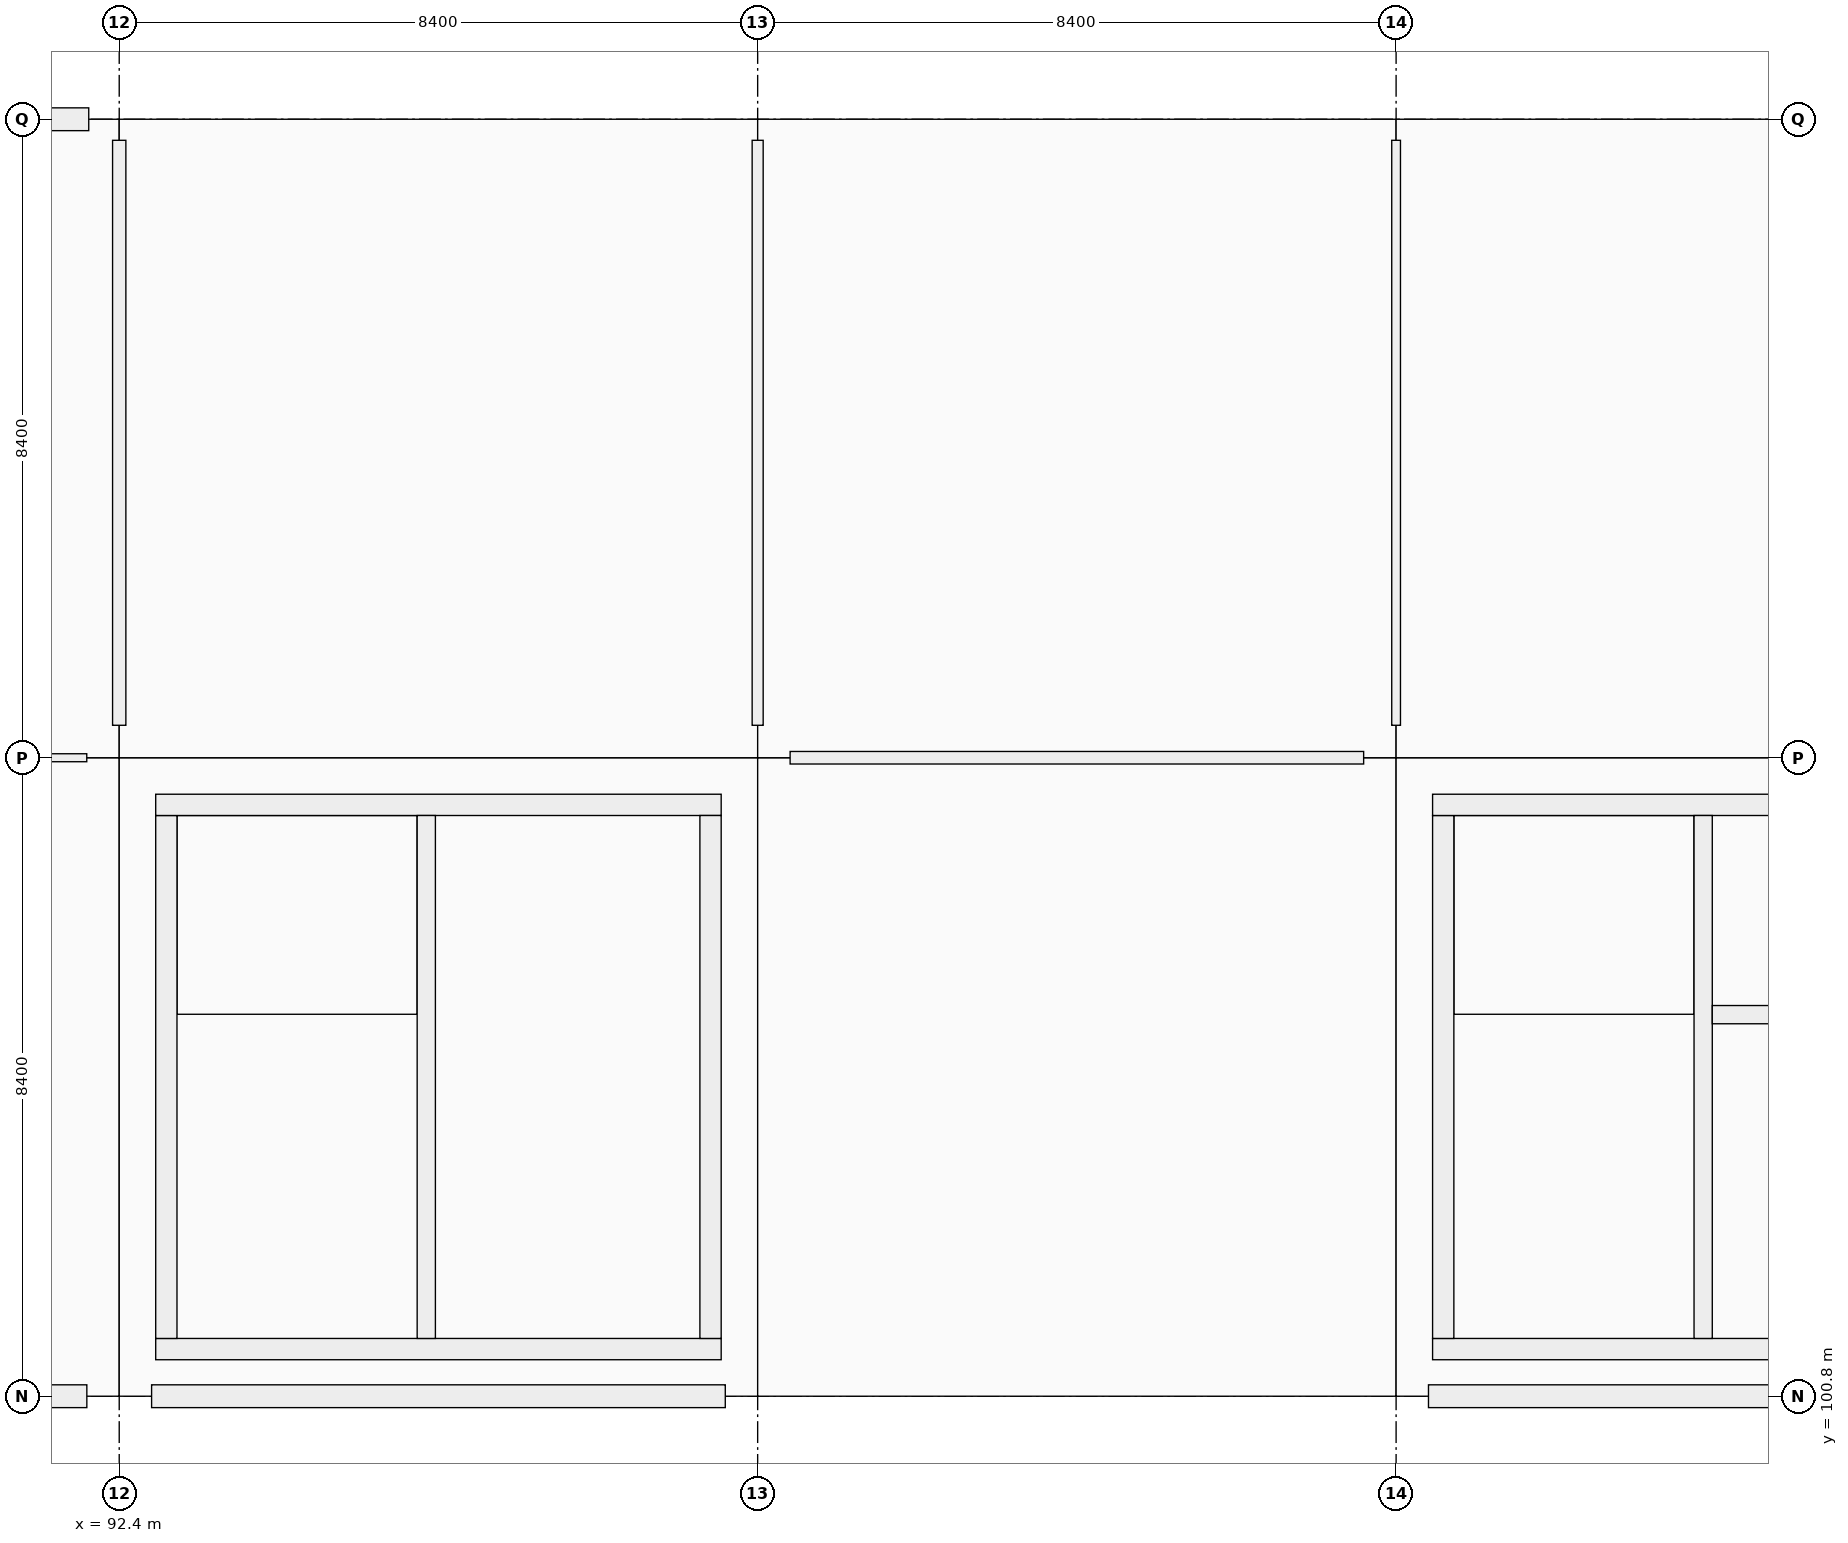
"""IFC4 building model, lengths in metres.
Left out: names, types, materials, properties, quantities, classifications, styles, units other than length and angle.
Written with IfcOpenShell. Run it as: python <this file> out.ifc"""

import sys

from ifc_helpers import new_model, si_unit, direction, frame, frame_2d, origin, origin_2d, place, context, subcontext, project, spatial, rectangle, extrude, element, fill, save


model = new_model("IFC4")
c1 = context("Model", 3, precision=1e-05, world=origin(), true_north=direction((0.0, 1.0)))
c2 = subcontext(c1, "Body", "Model", "MODEL_VIEW")
j1 = project(units=[si_unit("LENGTHUNIT", "METRE"), si_unit("PLANEANGLEUNIT", "RADIAN")], contexts=[c1])
p1 = place(None, origin())
s1 = spatial("IfcSite", under=j1, at=p1, CompositionType="ELEMENT")
p2 = place(p1, origin())
s2 = spatial("IfcBuilding", under=s1, at=p2, CompositionType="ELEMENT")
p3 = place(p2, frame((0.0, 0.0, 10.26)))
s3 = spatial("IfcBuildingStorey", under=s2, at=p3, CompositionType="ELEMENT", Elevation=10.26)
for number, where, z_axis, x_axis in (
    (1, (92.4, 100.8, 0.0), (0.0, 0.0, 1.0), (1.0, 0.0, 0.0)),
    (2, (92.4, 109.2, 0.0), (0.0, 0.0, 1.0), (1.0, 0.0, 0.0)),
):
    element("IfcColumn", number, at=place(p3, frame(where, z_axis=z_axis, x_axis=x_axis)), inside=s3, PredefinedType="COLUMN", context=c2, shape_type="SweptSolid", body=[
        extrude(rectangle(XDim=0.85, YDim=0.85, at=origin_2d()), origin(), (0.0, 0.0, 1.0), 4.5),
    ])
p4 = place(p3, frame((92.4, 117.6, 0.0), z_axis=(0.0, 0.0, 1.0), x_axis=(1.0, 0.0, 0.0)))
e3 = element("IfcColumn", 3, at=p4, inside=s3, PredefinedType="COLUMN", context=c2, shape_type="SweptSolid", body=[
    extrude(rectangle(XDim=0.8, YDim=0.55, at=origin_2d()), origin(), (0.0, 0.0, 1.0), 4.5),
])
for number, where, z_axis, x_axis in (
    (4, (100.8, 100.8, 0.0), (0.0, 0.0, 1.0), (1.0, 0.0, 0.0)),
    (5, (100.8, 109.2, 0.0), (0.0, 0.0, 1.0), (1.0, 0.0, 0.0)),
):
    element("IfcColumn", number, at=place(p3, frame(where, z_axis=z_axis, x_axis=x_axis)), inside=s3, PredefinedType="COLUMN", context=c2, shape_type="SweptSolid", body=[
        extrude(rectangle(XDim=0.85, YDim=0.85, at=origin_2d()), origin(), (0.0, 0.0, 1.0), 4.5),
    ])
p5 = place(p3, frame((100.8, 117.6, 0.0), z_axis=(0.0, 0.0, 1.0), x_axis=(1.0, 0.0, 0.0)))
e6 = element("IfcColumn", 6, at=p5, inside=s3, PredefinedType="COLUMN", context=c2, shape_type="SweptSolid", body=[
    extrude(rectangle(XDim=0.8, YDim=0.55, at=origin_2d()), origin(), (0.0, 0.0, 1.0), 4.5),
])
for number, where, z_axis, x_axis in (
    (7, (109.2, 100.8, 0.0), (0.0, 0.0, 1.0), (1.0, 0.0, 0.0)),
    (8, (109.2, 109.2, 0.0), (0.0, 0.0, 1.0), (1.0, 0.0, 0.0)),
):
    element("IfcColumn", number, at=place(p3, frame(where, z_axis=z_axis, x_axis=x_axis)), inside=s3, PredefinedType="COLUMN", context=c2, shape_type="SweptSolid", body=[
        extrude(rectangle(XDim=0.85, YDim=0.85, at=origin_2d()), origin(), (0.0, 0.0, 1.0), 4.5),
    ])
p6 = place(p3, frame((109.2, 117.6, 0.0), z_axis=(0.0, 0.0, 1.0), x_axis=(1.0, 0.0, 0.0)))
e9 = element("IfcColumn", 9, at=p6, inside=s3, PredefinedType="COLUMN", context=c2, shape_type="SweptSolid", body=[
    extrude(rectangle(XDim=0.8, YDim=0.55, at=origin_2d()), origin(), (0.0, 0.0, 1.0), 4.5),
])
p7 = place(p3, frame((91.974, 100.8, 0.0), z_axis=(0.0, 0.0, 1.0), x_axis=(-1.0, 0.0, 0.0)))
e10 = element("IfcWall", 10, at=p7, inside=s3, PredefinedType="SOLIDWALL", context=c2, shape_type="SweptSolid", body=[
    extrude(rectangle(XDim=7.548, YDim=0.3, at=frame_2d((3.774, 0.0))), origin(), (0.0, 0.0, 1.0), 3.54),
])
p8 = place(p7, frame((3.324, 0.0, 0.9)))
e11 = element("IfcOpeningElement", 11, at=p8, cuts=e10, PredefinedType="OPENING", context=c2, shape_type="SweptSolid", body=[
    extrude(rectangle(XDim=0.9, YDim=1.5, at=frame_2d((0.45, 0.75))), frame((0.0, 0.15, 0.0), z_axis=(0.0, -1.0, 0.0), x_axis=(1.0, 0.0, 0.0)), (0.0, 0.0, 1.0), 0.3),
])
p9 = place(p3, frame((84.401, 117.6, 0.0), z_axis=(0.0, 0.0, 1.0), x_axis=(1.0, 0.0, 0.0)))
e12 = element("IfcWall", 12, at=p9, inside=s3, PredefinedType="SOLIDWALL", context=c2, shape_type="SweptSolid", body=[
    extrude(rectangle(XDim=7.598, YDim=0.3, at=frame_2d((3.799, 0.0))), origin(), (0.0, 0.0, 1.0), 3.54),
])
p10 = place(p9, frame((2.949, 0.0, 0.9)))
e13 = element("IfcOpeningElement", 13, at=p10, cuts=e12, PredefinedType="OPENING", context=c2, shape_type="SweptSolid", body=[
    extrude(rectangle(XDim=1.7, YDim=1.85, at=frame_2d((0.85, 0.925))), frame((0.0, 0.15, 0.0), z_axis=(0.0, -1.0, 0.0), x_axis=(1.0, 0.0, 0.0)), (0.0, 0.0, 1.0), 0.3),
])
for number, where, z_axis, x_axis in (
    (14, (100.374, 100.8, 0.0), (0.0, 0.0, 1.0), (-1.0, 0.0, 0.0)),
    (15, (117.174, 100.8, 0.0), (0.0, 0.0, 1.0), (-1.0, 0.0, 0.0)),
):
    element("IfcWall", number, at=place(p3, frame(where, z_axis=z_axis, x_axis=x_axis)), inside=s3, PredefinedType="SOLIDWALL", context=c2, shape_type="SweptSolid", body=[
        extrude(rectangle(XDim=7.548, YDim=0.3, at=frame_2d((3.774, 0.0))), origin(), (0.0, 0.0, 1.0), 3.54),
    ])
p11 = place(p3, frame((117.12, 101.42, 0.0), z_axis=(0.0, 0.0, 1.0), x_axis=(-1.0, 0.0, 0.0)))
e16 = element("IfcWall", 16, at=p11, inside=s3, PredefinedType="SHEAR", context=c2, shape_type="SweptSolid", body=[
    extrude(rectangle(XDim=7.44, YDim=0.28, at=frame_2d((3.72, 0.0))), origin(), (0.0, 0.0, 1.0), 4.5),
])
p12 = place(p3, frame((109.82, 101.56, 0.0), z_axis=(0.0, 0.0, 1.0), x_axis=(0.0, 1.0, 0.0)))
e17 = element("IfcWall", 17, at=p12, inside=s3, PredefinedType="SHEAR", context=c2, shape_type="SweptSolid", body=[
    extrude(rectangle(XDim=6.88, YDim=0.28, at=frame_2d((3.44, 0.0))), origin(), (0.0, 0.0, 1.0), 4.5),
])
p13 = place(p3, frame((109.68, 108.58, 0.0), z_axis=(0.0, 0.0, 1.0), x_axis=(1.0, 0.0, 0.0)))
e18 = element("IfcWall", 18, at=p13, inside=s3, PredefinedType="SHEAR", context=c2, shape_type="SweptSolid", body=[
    extrude(rectangle(XDim=7.44, YDim=0.28, at=frame_2d((3.72, 0.0))), origin(), (0.0, 0.0, 1.0), 4.5),
])
p14 = place(p3, frame((113.24, 101.56, 0.0), z_axis=(0.0, 0.0, 1.0), x_axis=(0.0, 1.0, 0.0)))
e19 = element("IfcWall", 19, at=p14, inside=s3, PredefinedType="SHEAR", context=c2, shape_type="SweptSolid", body=[
    extrude(rectangle(XDim=6.88, YDim=0.24, at=frame_2d((3.44, 0.0))), origin(), (0.0, 0.0, 1.0), 4.5),
])
p15 = place(p14, frame((0.12, 0.0, 0.0)))
e20 = element("IfcOpeningElement", 20, at=p15, cuts=e19, PredefinedType="OPENING", context=c2, shape_type="SweptSolid", body=[
    extrude(rectangle(XDim=1.0, YDim=2.15, at=frame_2d((0.5, 1.075))), frame((0.0, 0.12, 0.0), z_axis=(0.0, -1.0, 0.0), x_axis=(1.0, 0.0, 0.0)), (0.0, 0.0, 1.0), 0.24),
])
p16 = place(p3, frame((113.36, 105.82, 0.0), z_axis=(0.0, 0.0, 1.0), x_axis=(1.0, 0.0, 0.0)))
e21 = element("IfcWall", 21, at=p16, inside=s3, PredefinedType="SHEAR", context=c2, shape_type="SweptSolid", body=[
    extrude(rectangle(XDim=3.48, YDim=0.24, at=frame_2d((1.74, 0.0))), origin(), (0.0, 0.0, 1.0), 4.5),
])
p17 = place(p16, frame((1.14, 0.0, 0.0)))
e22 = element("IfcOpeningElement", 22, at=p17, cuts=e21, PredefinedType="OPENING", context=c2, shape_type="SweptSolid", body=[
    extrude(rectangle(XDim=1.2, YDim=2.2, at=frame_2d((0.6, 1.1))), frame((0.0, 0.12, 0.0), z_axis=(0.0, -1.0, 0.0), x_axis=(1.0, 0.0, 0.0)), (0.0, 0.0, 1.0), 0.24),
])
p18 = place(p3, frame((100.32, 101.42, 0.0), z_axis=(0.0, 0.0, 1.0), x_axis=(-1.0, 0.0, 0.0)))
e23 = element("IfcWall", 23, at=p18, inside=s3, PredefinedType="SHEAR", context=c2, shape_type="SweptSolid", body=[
    extrude(rectangle(XDim=7.44, YDim=0.28, at=frame_2d((3.72, 0.0))), origin(), (0.0, 0.0, 1.0), 4.5),
])
p19 = place(p3, frame((93.02, 101.56, 0.0), z_axis=(0.0, 0.0, 1.0), x_axis=(0.0, 1.0, 0.0)))
e24 = element("IfcWall", 24, at=p19, inside=s3, PredefinedType="SHEAR", context=c2, shape_type="SweptSolid", body=[
    extrude(rectangle(XDim=6.88, YDim=0.28, at=frame_2d((3.44, 0.0))), origin(), (0.0, 0.0, 1.0), 4.5),
])
p20 = place(p3, frame((92.88, 108.58, 0.0), z_axis=(0.0, 0.0, 1.0), x_axis=(1.0, 0.0, 0.0)))
e25 = element("IfcWall", 25, at=p20, inside=s3, PredefinedType="SHEAR", context=c2, shape_type="SweptSolid", body=[
    extrude(rectangle(XDim=7.44, YDim=0.28, at=frame_2d((3.72, 0.0))), origin(), (0.0, 0.0, 1.0), 4.5),
])
p21 = place(p3, frame((100.18, 108.44, 0.0), z_axis=(0.0, 0.0, 1.0), x_axis=(0.0, -1.0, 0.0)))
e26 = element("IfcWall", 26, at=p21, inside=s3, PredefinedType="SHEAR", context=c2, shape_type="SweptSolid", body=[
    extrude(rectangle(XDim=6.88, YDim=0.28, at=frame_2d((3.44, 0.0))), origin(), (0.0, 0.0, 1.0), 4.5),
])
p22 = place(p21, frame((3.99, 0.0, 0.0)))
e27 = element("IfcOpeningElement", 27, at=p22, cuts=e26, PredefinedType="OPENING", context=c2, shape_type="SweptSolid", body=[
    extrude(rectangle(XDim=1.5, YDim=2.15, at=frame_2d((0.75, 1.075))), frame((0.0, 0.14, 0.0), z_axis=(0.0, -1.0, 0.0), x_axis=(1.0, 0.0, 0.0)), (0.0, 0.0, 1.0), 0.28),
])
p23 = place(p3, frame((96.44, 101.56, 0.0), z_axis=(0.0, 0.0, 1.0), x_axis=(0.0, 1.0, 0.0)))
e28 = element("IfcWall", 28, at=p23, inside=s3, PredefinedType="SHEAR", context=c2, shape_type="SweptSolid", body=[
    extrude(rectangle(XDim=6.88, YDim=0.24, at=frame_2d((3.44, 0.0))), origin(), (0.0, 0.0, 1.0), 4.5),
])
p24 = place(p23, frame((0.12, 0.0, 0.0)))
e29 = element("IfcOpeningElement", 29, at=p24, cuts=e28, PredefinedType="OPENING", context=c2, shape_type="SweptSolid", body=[
    extrude(rectangle(XDim=1.0, YDim=2.15, at=frame_2d((0.5, 1.075))), frame((0.0, 0.12, 0.0), z_axis=(0.0, -1.0, 0.0), x_axis=(1.0, 0.0, 0.0)), (0.0, 0.0, 1.0), 0.24),
])
p25 = place(p3, frame((84.427, 109.2, 0.0), z_axis=(0.0, 0.0, 1.0), x_axis=(1.0, 0.0, 0.0)))
e30 = element("IfcWall", 30, at=p25, inside=s3, PredefinedType="PARTITIONING", context=c2, shape_type="SweptSolid", body=[
    extrude(rectangle(XDim=7.546, YDim=0.105, at=frame_2d((3.773, 0.0))), origin(), (0.0, 0.0, 1.0), 3.37),
])
p26 = place(p25, frame((3.288, 0.0, 0.0)))
e31 = element("IfcOpeningElement", 31, at=p26, cuts=e30, PredefinedType="OPENING", context=c2, shape_type="SweptSolid", body=[
    extrude(rectangle(XDim=0.97, YDim=2.12, at=frame_2d((0.485, 1.06))), frame((0.0, 0.052, 0.0), z_axis=(0.0, -1.0, 0.0), x_axis=(1.0, 0.0, 0.0)), (0.0, 0.0, 1.0), 0.105),
])
p27 = place(p3, frame((101.227, 109.2, 0.0), z_axis=(0.0, 0.0, 1.0), x_axis=(1.0, 0.0, 0.0)))
e32 = element("IfcWall", 32, at=p27, inside=s3, PredefinedType="PARTITIONING", context=c2, shape_type="SweptSolid", body=[
    extrude(rectangle(XDim=7.546, YDim=0.165, at=frame_2d((3.773, 0.0))), origin(), (0.0, 0.0, 1.0), 3.37),
])
p28 = place(p27, frame((3.273, 0.0, 0.0)))
e33 = element("IfcOpeningElement", 33, at=p28, cuts=e32, PredefinedType="OPENING", context=c2, shape_type="SweptSolid", body=[
    extrude(rectangle(XDim=1.0, YDim=2.2, at=frame_2d((0.5, 1.1))), frame((0.0, 0.083, 0.0), z_axis=(0.0, -1.0, 0.0), x_axis=(1.0, 0.0, 0.0)), (0.0, 0.0, 1.0), 0.165),
])
p29 = place(p3, frame((92.4, 109.627, 0.0), z_axis=(0.0, 0.0, 1.0), x_axis=(0.0, 1.0, 0.0)))
e34 = element("IfcWall", 34, at=p29, inside=s3, PredefinedType="PARTITIONING", context=c2, shape_type="SweptSolid", body=[
    extrude(rectangle(XDim=7.696, YDim=0.175, at=frame_2d((3.848, 0.0))), origin(), (0.0, 0.0, 1.0), 3.37),
])
p30 = place(p29, frame((3.363, 0.0, 0.0)))
e35 = element("IfcOpeningElement", 35, at=p30, cuts=e34, PredefinedType="OPENING", context=c2, shape_type="SweptSolid", body=[
    extrude(rectangle(XDim=0.97, YDim=2.12, at=frame_2d((0.485, 1.06))), frame((0.0, 0.087, 0.0), z_axis=(0.0, -1.0, 0.0), x_axis=(1.0, 0.0, 0.0)), (0.0, 0.0, 1.0), 0.175),
])
p31 = place(p3, frame((100.8, 109.627, 0.0), z_axis=(0.0, 0.0, 1.0), x_axis=(0.0, 1.0, 0.0)))
e36 = element("IfcWall", 36, at=p31, inside=s3, PredefinedType="PARTITIONING", context=c2, shape_type="SweptSolid", body=[
    extrude(rectangle(XDim=7.696, YDim=0.145, at=frame_2d((3.848, 0.0))), origin(), (0.0, 0.0, 1.0), 3.37),
])
p32 = place(p31, frame((3.388, 0.0, 0.0)))
e37 = element("IfcOpeningElement", 37, at=p32, cuts=e36, PredefinedType="OPENING", context=c2, shape_type="SweptSolid", body=[
    extrude(rectangle(XDim=0.92, YDim=2.15, at=frame_2d((0.46, 1.075))), frame((0.0, 0.073, 0.0), z_axis=(0.0, -1.0, 0.0), x_axis=(1.0, 0.0, 0.0)), (0.0, 0.0, 1.0), 0.145),
])
p33 = place(p3, frame((109.2, 109.627, 0.0), z_axis=(0.0, 0.0, 1.0), x_axis=(0.0, 1.0, 0.0)))
e38 = element("IfcWall", 38, at=p33, inside=s3, PredefinedType="PARTITIONING", context=c2, shape_type="SweptSolid", body=[
    extrude(rectangle(XDim=7.696, YDim=0.115, at=frame_2d((3.848, 0.0))), origin(), (0.0, 0.0, 1.0), 3.37),
])
p34 = place(p33, frame((3.383, 0.0, 0.0)))
e39 = element("IfcOpeningElement", 39, at=p34, cuts=e38, PredefinedType="OPENING", context=c2, shape_type="SweptSolid", body=[
    extrude(rectangle(XDim=0.93, YDim=2.12, at=frame_2d((0.465, 1.06))), frame((0.0, 0.058, 0.0), z_axis=(0.0, -1.0, 0.0), x_axis=(1.0, 0.0, 0.0)), (0.0, 0.0, 1.0), 0.115),
])
p35 = place(p15, origin())
e40 = element("IfcDoor", 40, at=p35, inside=s3, OperationType="SINGLE_SWING_LEFT", PredefinedType="DOOR", context=c2, shape_type="SweptSolid", body=[
    extrude(rectangle(XDim=1.0, YDim=2.15, at=frame_2d((0.5, 1.075))), frame((0.0, 0.025, 0.0), z_axis=(0.0, -1.0, 0.0), x_axis=(1.0, 0.0, 0.0)), (0.0, 0.0, 1.0), 0.05),
])
fill(e20, e40)
p36 = place(p24, origin())
e41 = element("IfcDoor", 41, at=p36, inside=s3, OperationType="SINGLE_SWING_LEFT", PredefinedType="DOOR", context=c2, shape_type="SweptSolid", body=[
    extrude(rectangle(XDim=1.0, YDim=2.15, at=frame_2d((0.5, 1.075))), frame((0.0, 0.025, 0.0), z_axis=(0.0, -1.0, 0.0), x_axis=(1.0, 0.0, 0.0)), (0.0, 0.0, 1.0), 0.05),
])
fill(e29, e41)
p37 = place(p22, origin())
e42 = element("IfcDoor", 42, at=p37, inside=s3, OperationType="DOUBLE_DOOR_SINGLE_SWING", PredefinedType="DOOR", context=c2, shape_type="SweptSolid", body=[
    extrude(rectangle(XDim=1.5, YDim=2.15, at=frame_2d((0.75, 1.075))), frame((0.0, 0.025, 0.0), z_axis=(0.0, -1.0, 0.0), x_axis=(1.0, 0.0, 0.0)), (0.0, 0.0, 1.0), 0.05),
])
fill(e27, e42)
p38 = place(p28, origin())
e43 = element("IfcDoor", 43, at=p38, inside=s3, OperationType="SINGLE_SWING_RIGHT", PredefinedType="DOOR", context=c2, shape_type="SweptSolid", body=[
    extrude(rectangle(XDim=1.0, YDim=2.2, at=frame_2d((0.5, 1.1))), frame((0.0, 0.025, 0.0), z_axis=(0.0, -1.0, 0.0), x_axis=(1.0, 0.0, 0.0)), (0.0, 0.0, 1.0), 0.05),
])
fill(e33, e43)
p39 = place(p30, origin())
e44 = element("IfcDoor", 44, at=p39, inside=s3, OperationType="SINGLE_SWING_LEFT", PredefinedType="DOOR", context=c2, shape_type="SweptSolid", body=[
    extrude(rectangle(XDim=0.97, YDim=2.12, at=frame_2d((0.485, 1.06))), frame((0.0, 0.025, 0.0), z_axis=(0.0, -1.0, 0.0), x_axis=(1.0, 0.0, 0.0)), (0.0, 0.0, 1.0), 0.05),
])
fill(e35, e44)
p40 = place(p34, origin())
e45 = element("IfcDoor", 45, at=p40, inside=s3, OperationType="SINGLE_SWING_RIGHT", PredefinedType="DOOR", context=c2, shape_type="SweptSolid", body=[
    extrude(rectangle(XDim=0.93, YDim=2.12, at=frame_2d((0.465, 1.06))), frame((0.0, 0.025, 0.0), z_axis=(0.0, -1.0, 0.0), x_axis=(1.0, 0.0, 0.0)), (0.0, 0.0, 1.0), 0.05),
])
fill(e39, e45)
p41 = place(p32, origin())
e46 = element("IfcDoor", 46, at=p41, inside=s3, OperationType="SINGLE_SWING_RIGHT", PredefinedType="DOOR", context=c2, shape_type="SweptSolid", body=[
    extrude(rectangle(XDim=0.92, YDim=2.15, at=frame_2d((0.46, 1.075))), frame((0.0, 0.025, 0.0), z_axis=(0.0, -1.0, 0.0), x_axis=(1.0, 0.0, 0.0)), (0.0, 0.0, 1.0), 0.05),
])
fill(e37, e46)
save(model, sys.argv[1])
